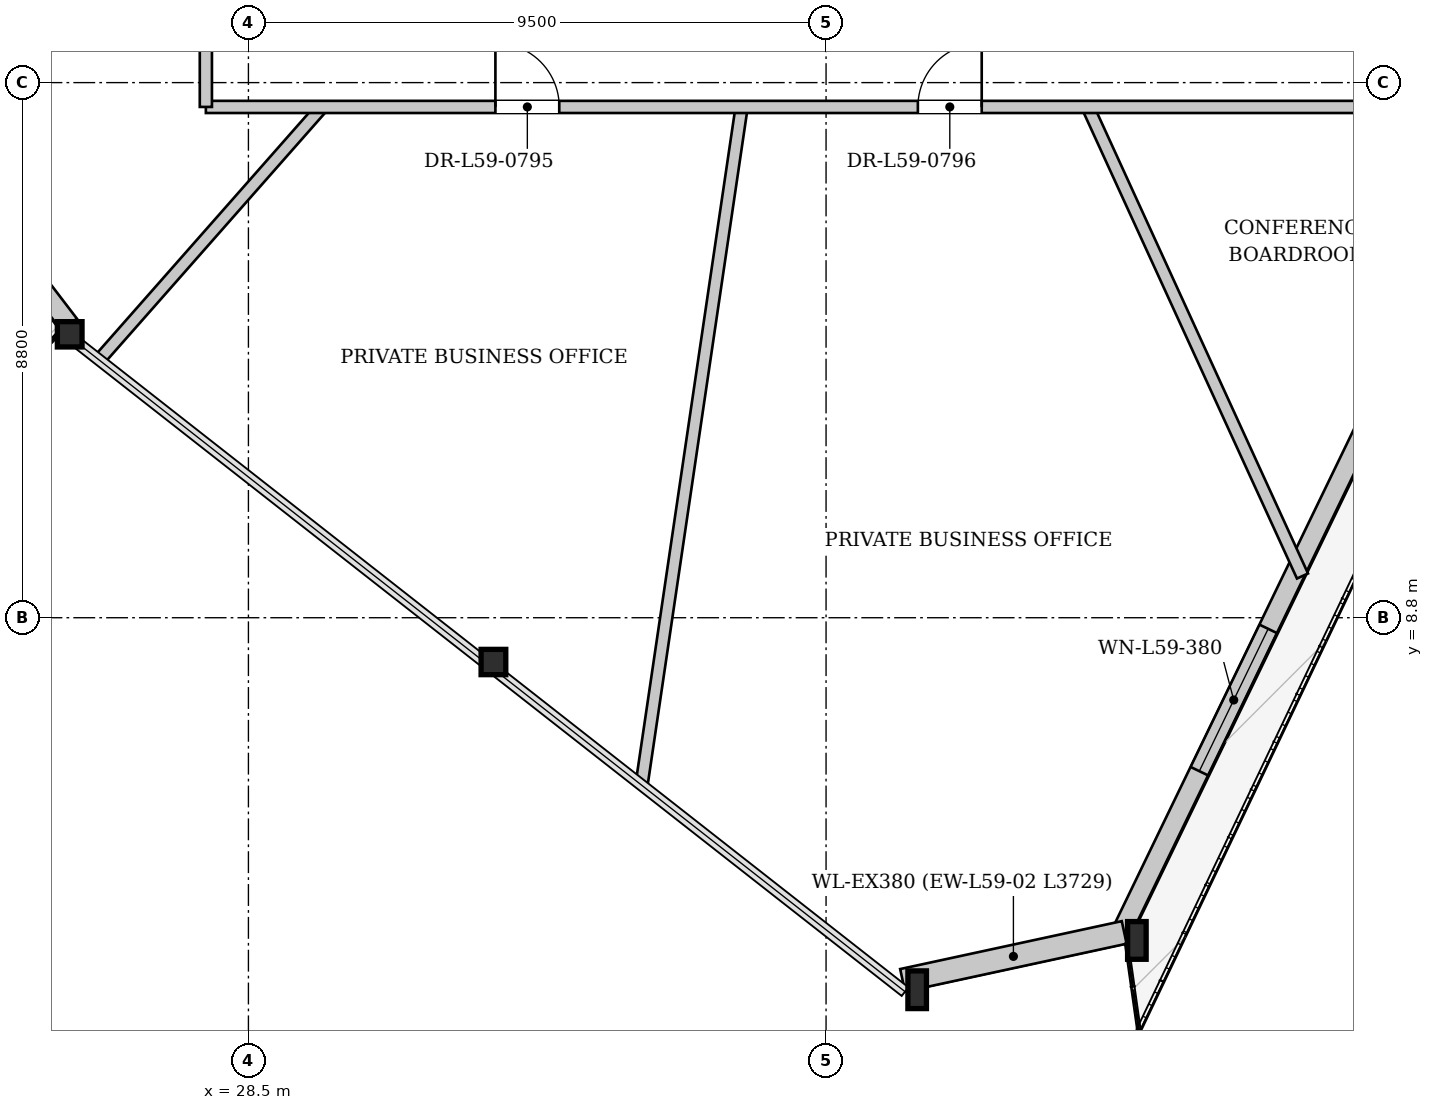
"""IFC4 building model, lengths in metres.
Left out: names, types, materials, properties, quantities, classifications, styles, units other than length and angle.
Written with IfcOpenShell. Run it as: python <this file> out.ifc"""

import sys

from ifc_helpers import new_model, si_unit, direction, frame, frame_2d, origin, origin_2d, place, context, subcontext, project, spatial, rectangle, i_section, extrude, source, transform, mapped, element, fill, save


model = new_model("IFC4")
c1 = context("Model", 3, precision=1e-05, world=origin(), true_north=direction((0.0, 1.0)))
c2 = subcontext(c1, "Body", "Model", "MODEL_VIEW")
j1 = project(units=[si_unit("LENGTHUNIT", "METRE"), si_unit("PLANEANGLEUNIT", "RADIAN")], contexts=[c1])
p1 = place(None, origin())
s1 = spatial("IfcSite", under=j1, at=p1, CompositionType="ELEMENT")
p2 = place(p1, origin())
s2 = spatial("IfcBuilding", under=s1, at=p2, CompositionType="ELEMENT")
p3 = place(p2, frame((0.0, 0.0, 223.8)))
s3 = spatial("IfcBuildingStorey", under=s2, at=p3, CompositionType="ELEMENT", Elevation=223.8)
m1 = source(origin(), c2, "Body", "SweptSolid", [
    extrude(i_section(OverallWidth=0.406, OverallDepth=0.416, WebThickness=0.027, FlangeThickness=0.042, at=origin_2d()), origin(), (0.0, 0.0, 1.0), 3.398),
])
p4 = place(p3, frame((25.425, 13.525, 0.0), z_axis=(0.080031554619, -0.037573162537, 0.996083936083), x_axis=(0.424975081245, 0.905205048771, 0.0)))
e1 = element("IfcColumn", 1, at=p4, inside=s3, PredefinedType="COLUMN", context=c2, shape_type="MappedRepresentation", body=[
    mapped(m1, transform((0.0, 0.0, 0.0), x_axis=(1.0, 0.0, 0.0), y_axis=(0.0, 1.0, 0.0), z_axis=(0.0, 0.0, 1.0), scale=1.0)),
])
m2 = source(origin(), c2, "Body", "SweptSolid", [
    extrude(i_section(OverallWidth=0.406, OverallDepth=0.416, WebThickness=0.027, FlangeThickness=0.042, at=origin_2d()), origin(), (0.0, 0.0, 1.0), 3.402),
])
p5 = place(p3, frame((32.362, 8.088, 0.0), z_axis=(0.098539908437, -0.009473611008, 0.995088004721), x_axis=(0.095698592254, 0.99541035731, 0.0)))
e2 = element("IfcColumn", 2, at=p5, inside=s3, PredefinedType="COLUMN", context=c2, shape_type="MappedRepresentation", body=[
    mapped(m2, transform((0.0, 0.0, 0.0), x_axis=(1.0, 0.0, 0.0), y_axis=(0.0, 1.0, 0.0), z_axis=(0.0, 0.0, 1.0), scale=1.0)),
])
m3 = source(origin(), c2, "Body", "SweptSolid", [
    extrude(i_section(OverallWidth=0.305, OverallDepth=0.62, WebThickness=0.021, FlangeThickness=0.04, at=origin_2d()), origin(), (0.0, 0.0, 1.0), 3.409),
])
p6 = place(p3, frame((39.299, 2.651, 0.0), z_axis=(0.116879628474, 0.018405676788, 0.992975520096), x_axis=(-0.155558491149, 0.987826683093, 0.0)))
e3 = element("IfcColumn", 3, at=p6, inside=s3, PredefinedType="COLUMN", context=c2, shape_type="MappedRepresentation", body=[
    mapped(m3, transform((0.0, 0.0, 0.0), x_axis=(1.0, 0.0, 0.0), y_axis=(0.0, 1.0, 0.0), z_axis=(0.0, 0.0, 1.0), scale=1.0)),
])
m4 = source(origin(), c2, "Body", "SweptSolid", [
    extrude(i_section(OverallWidth=0.305, OverallDepth=0.62, WebThickness=0.021, FlangeThickness=0.04, at=origin_2d()), origin(), (0.0, 0.0, 1.0), 3.403),
])
p7 = place(p3, frame((42.944, 3.439, 0.0), z_axis=(0.098707447122, 0.031850368112, 0.99460665287), x_axis=(-0.307083610191, 0.951682539691, 0.0)))
e4 = element("IfcColumn", 4, at=p7, inside=s3, PredefinedType="COLUMN", context=c2, shape_type="MappedRepresentation", body=[
    mapped(m4, transform((0.0, 0.0, 0.0), x_axis=(1.0, 0.0, 0.0), y_axis=(0.0, 1.0, 0.0), z_axis=(0.0, 0.0, 1.0), scale=1.0)),
])
p8 = place(p3, frame((52.807, 24.197, 0.0), z_axis=(0.0, 0.0, 1.0), x_axis=(-0.435460131782, -0.900208016865, 0.0)))
e5 = element("IfcWall", 5, at=p8, inside=s3, PredefinedType="SOLIDWALL", context=c2, shape_type="SweptSolid", body=[
    extrude(rectangle(XDim=22.982, YDim=0.32, at=frame_2d((11.491, 0.0))), origin(), (0.0, 0.0, 1.0), 2.822),
])
p9 = place(p8, frame((6.804, 0.0, 0.0)))
e6 = element("IfcOpeningElement", 6, at=p9, cuts=e5, PredefinedType="OPENING", context=c2, shape_type="SweptSolid", body=[
    extrude(rectangle(XDim=1.5, YDim=2.3, at=frame_2d((0.75, 1.15))), frame((0.0, 0.17, 0.0), z_axis=(0.0, -1.0, 0.0), x_axis=(1.0, 0.0, 0.0)), (0.0, 0.0, 1.0), 0.34),
])
p10 = place(p8, frame((17.307, 0.0, 0.352)))
e7 = element("IfcOpeningElement", 7, at=p10, cuts=e5, PredefinedType="OPENING", context=c2, shape_type="SweptSolid", body=[
    extrude(rectangle(XDim=2.6, YDim=2.35, at=frame_2d((1.3, 1.175))), frame((0.0, 0.17, 0.0), z_axis=(0.0, -1.0, 0.0), x_axis=(1.0, 0.0, 0.0)), (0.0, 0.0, 1.0), 0.34),
])
p11 = place(p3, frame((42.903, 3.625, 0.0), z_axis=(0.0, 0.0, 1.0), x_axis=(-0.977406853857, -0.211366605765, 0.0)))
e8 = element("IfcWall", 8, at=p11, inside=s3, PredefinedType="SOLIDWALL", context=c2, shape_type="SweptSolid", body=[
    extrude(rectangle(XDim=3.729, YDim=0.38, at=frame_2d((1.864, 0.0))), origin(), (0.0, 0.0, 1.0), 2.822),
])
p12 = place(p3, frame((25.552, 13.622, 0.0), z_axis=(0.0, 0.0, 1.0), x_axis=(-0.607219266327, 0.79453430549, 0.0)))
e9 = element("IfcWall", 9, at=p12, inside=s3, PredefinedType="SOLIDWALL", context=c2, shape_type="SweptSolid", body=[
    extrude(rectangle(XDim=17.628, YDim=0.32, at=frame_2d((8.814, 0.0))), origin(), (0.0, 0.0, 1.0), 2.822),
])
p13 = place(p12, frame((4.891, 0.0, 0.0)))
e10 = element("IfcOpeningElement", 10, at=p13, cuts=e9, PredefinedType="OPENING", context=c2, shape_type="SweptSolid", body=[
    extrude(rectangle(XDim=1.5, YDim=2.3, at=frame_2d((0.75, 1.15))), frame((0.0, 0.17, 0.0), z_axis=(0.0, -1.0, 0.0), x_axis=(1.0, 0.0, 0.0)), (0.0, 0.0, 1.0), 0.34),
])
p14 = place(p12, frame((11.745, 0.0, 0.352)))
e11 = element("IfcOpeningElement", 11, at=p14, cuts=e9, PredefinedType="OPENING", context=c2, shape_type="SweptSolid", body=[
    extrude(rectangle(XDim=2.6, YDim=2.35, at=frame_2d((1.3, 1.175))), frame((0.0, 0.17, 0.0), z_axis=(0.0, -1.0, 0.0), x_axis=(1.0, 0.0, 0.0)), (0.0, 0.0, 1.0), 0.34),
])
p15 = place(p3, frame((29.713, 17.2, 0.0), z_axis=(0.0, 0.0, 1.0), x_axis=(-0.661328876808, -0.750096071647, 0.0)))
e12 = element("IfcWall", 12, at=p15, inside=s3, PredefinedType="PARTITIONING", context=c2, shape_type="SweptSolid", body=[
    extrude(rectangle(XDim=5.517, YDim=0.2, at=frame_2d((2.759, 0.0))), origin(), (0.0, 0.0, 1.0), 3.33),
])
p16 = place(p3, frame((36.612, 17.2, 0.0), z_axis=(0.0, 0.0, 1.0), x_axis=(-0.146066825949, -0.989274725421, 0.0)))
e13 = element("IfcWall", 13, at=p16, inside=s3, PredefinedType="PARTITIONING", context=c2, shape_type="SweptSolid", body=[
    extrude(rectangle(XDim=11.239, YDim=0.2, at=frame_2d((5.619, 0.0))), origin(), (0.0, 0.0, 1.0), 3.33),
])
p17 = place(p3, frame((42.304, 17.2, 0.0), z_axis=(0.0, 0.0, 1.0), x_axis=(0.416275176363, -0.909238680185, 0.0)))
e14 = element("IfcWall", 14, at=p17, inside=s3, PredefinedType="PARTITIONING", context=c2, shape_type="SweptSolid", body=[
    extrude(rectangle(XDim=8.484, YDim=0.2, at=frame_2d((4.242, 0.0))), origin(), (0.0, 0.0, 1.0), 3.33),
])
p18 = place(p3, frame((27.8, 17.2, 0.0), z_axis=(0.0, 0.0, 1.0), x_axis=(1.0, 0.0, 0.0)))
e15 = element("IfcWall", 15, at=p18, inside=s3, PredefinedType="PARTITIONING", context=c2, shape_type="SweptSolid", body=[
    extrude(rectangle(XDim=20.4, YDim=0.2, at=frame_2d((10.2, 0.0))), origin(), (0.0, 0.0, 1.0), 3.33),
])
p19 = place(p18, frame((4.762, 0.0, 0.0)))
e16 = element("IfcOpeningElement", 16, at=p19, cuts=e15, PredefinedType="OPENING", context=c2, shape_type="SweptSolid", body=[
    extrude(rectangle(XDim=1.05, YDim=2.2, at=frame_2d((0.525, 1.1))), frame((0.0, 0.11, 0.0), z_axis=(0.0, -1.0, 0.0), x_axis=(1.0, 0.0, 0.0)), (0.0, 0.0, 1.0), 0.22),
])
p20 = place(p18, frame((11.71, 0.0, 0.0)))
e17 = element("IfcOpeningElement", 17, at=p20, cuts=e15, PredefinedType="OPENING", context=c2, shape_type="SweptSolid", body=[
    extrude(rectangle(XDim=1.05, YDim=2.2, at=frame_2d((0.525, 1.1))), frame((0.0, 0.11, 0.0), z_axis=(0.0, -1.0, 0.0), x_axis=(1.0, 0.0, 0.0)), (0.0, 0.0, 1.0), 0.22),
])
p21 = place(p3, frame((27.8, 17.2, 0.0), z_axis=(0.0, 0.0, 1.0), x_axis=(0.0, 1.0, 0.0)))
e18 = element("IfcWall", 18, at=p21, inside=s3, PredefinedType="PARTITIONING", context=c2, shape_type="SweptSolid", body=[
    extrude(rectangle(XDim=18.8, YDim=0.2, at=frame_2d((9.4, 0.0))), origin(), (0.0, 0.0, 1.0), 3.33),
])
p22 = place(p21, frame((7.944, 0.0, 0.0)))
e19 = element("IfcOpeningElement", 19, at=p22, cuts=e18, PredefinedType="OPENING", context=c2, shape_type="SweptSolid", body=[
    extrude(rectangle(XDim=1.05, YDim=2.2, at=frame_2d((0.525, 1.1))), frame((0.0, 0.11, 0.0), z_axis=(0.0, -1.0, 0.0), x_axis=(1.0, 0.0, 0.0)), (0.0, 0.0, 1.0), 0.22),
])
p23 = place(p21, frame((1.628, 0.0, 0.0)))
e20 = element("IfcOpeningElement", 20, at=p23, cuts=e18, PredefinedType="OPENING", context=c2, shape_type="SweptSolid", body=[
    extrude(rectangle(XDim=1.05, YDim=2.2, at=frame_2d((0.525, 1.1))), frame((0.0, 0.11, 0.0), z_axis=(0.0, -1.0, 0.0), x_axis=(1.0, 0.0, 0.0)), (0.0, 0.0, 1.0), 0.22),
])
m5 = source(origin(), c2, "Body", "SweptSolid", [
    extrude(rectangle(XDim=2.6, YDim=2.35, at=frame_2d((1.3, 1.175))), frame((0.0, 0.03, 0.0), z_axis=(0.0, -1.0, 0.0), x_axis=(1.0, 0.0, 0.0)), (0.0, 0.0, 1.0), 0.06),
])
p24 = place(p10, origin())
e21 = element("IfcWindow", 21, at=p24, inside=s3, PartitioningType="SINGLE_PANEL", PredefinedType="WINDOW", context=c2, shape_type="MappedRepresentation", body=[
    mapped(m5, transform((0.0, 0.0, 0.0), x_axis=(1.0, 0.0, 0.0), y_axis=(0.0, 1.0, 0.0), z_axis=(0.0, 0.0, 1.0), scale=1.0)),
])
fill(e7, e21)
m6 = source(origin(), c2, "Body", "SweptSolid", [
    extrude(rectangle(XDim=1.05, YDim=2.2, at=frame_2d((0.525, 1.1))), frame((0.0, 0.025, 0.0), z_axis=(0.0, -1.0, 0.0), x_axis=(1.0, 0.0, 0.0)), (0.0, 0.0, 1.0), 0.05),
])
p25 = place(p19, origin())
e22 = element("IfcDoor", 22, at=p25, inside=s3, OperationType="SINGLE_SWING_LEFT", PredefinedType="DOOR", context=c2, shape_type="MappedRepresentation", body=[
    mapped(m6, transform((0.0, 0.0, 0.0), x_axis=(1.0, 0.0, 0.0), y_axis=(0.0, 1.0, 0.0), z_axis=(0.0, 0.0, 1.0), scale=1.0)),
])
fill(e16, e22)
p26 = place(p20, origin())
e23 = element("IfcDoor", 23, at=p26, inside=s3, OperationType="SINGLE_SWING_RIGHT", PredefinedType="DOOR", context=c2, shape_type="MappedRepresentation", body=[
    mapped(m6, transform((0.0, 0.0, 0.0), x_axis=(1.0, 0.0, 0.0), y_axis=(0.0, 1.0, 0.0), z_axis=(0.0, 0.0, 1.0), scale=1.0)),
])
fill(e17, e23)
save(model, sys.argv[1])
